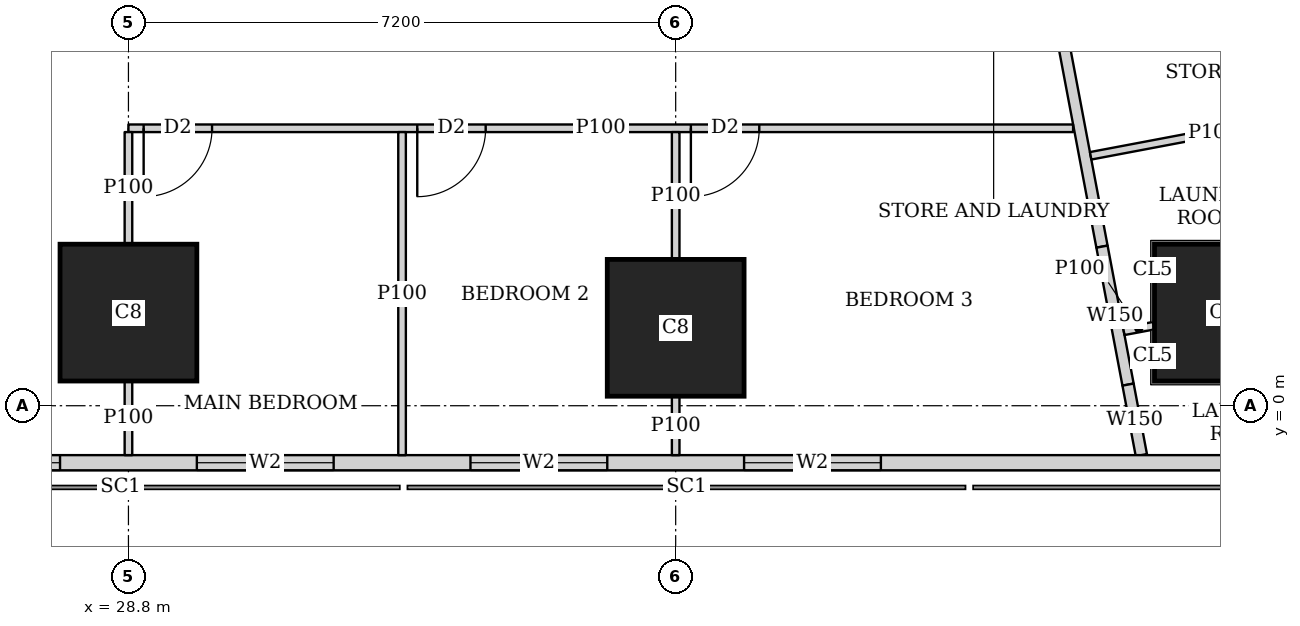
"""IFC4 building model, lengths in metres.
Left out: names, types, materials, properties, quantities, classifications, styles, units other than length and angle.
Written with IfcOpenShell. Run it as: python <this file> out.ifc"""

import sys

from ifc_helpers import new_model, si_unit, direction, frame, frame_2d, origin, origin_2d, place, context, subcontext, project, spatial, rectangle, extrude, element, fill, save


model = new_model("IFC4")
c1 = context("Model", 3, precision=1e-05, world=origin(), true_north=direction((0.0, 1.0)))
c2 = subcontext(c1, "Body", "Model", "MODEL_VIEW")
j1 = project(units=[si_unit("LENGTHUNIT", "METRE"), si_unit("PLANEANGLEUNIT", "RADIAN")], contexts=[c1])
p1 = place(None, origin())
s1 = spatial("IfcSite", under=j1, at=p1, CompositionType="ELEMENT")
p2 = place(p1, origin())
s2 = spatial("IfcBuilding", under=s1, at=p2, CompositionType="ELEMENT")
p3 = place(p2, frame((0.0, 0.0, 147.05)))
s3 = spatial("IfcBuildingStorey", under=s2, at=p3, CompositionType="ELEMENT", Elevation=147.05)
for number, where, z_axis, x_axis in (
    (1, (28.8, 1.225, 0.0), (0.0, 0.0, 1.0), (1.0, 0.0, 0.0)),
    (2, (36.0, 1.025, 0.0), (0.0, 0.0, 1.0), (1.0, 0.0, 0.0)),
    (3, (43.2, 1.225, 0.0), (0.0, 0.0, 1.0), (1.0, 0.0, 0.0)),
):
    element("IfcColumn", number, at=place(p3, frame(where, z_axis=z_axis, x_axis=x_axis)), inside=s3, PredefinedType="COLUMN", context=c2, shape_type="SweptSolid", body=[
        extrude(rectangle(XDim=1.8, YDim=1.8, at=origin_2d()), origin(), (0.0, 0.0, 1.0), 3.75),
    ])
p4 = place(p3, frame((2.163, -0.75, 0.0), z_axis=(0.0, 0.0, 1.0), x_axis=(1.0, 0.0, 0.0)))
e4 = element("IfcWall", 4, at=p4, inside=s3, PredefinedType="SOLIDWALL", context=c2, shape_type="SweptSolid", body=[
    extrude(rectangle(XDim=45.628, YDim=0.2, at=frame_2d((22.814, 0.0))), origin(), (0.0, 0.0, 1.0), 3.5),
])
p5 = place(p4, frame((9.537, 0.0, 0.9)))
e5 = element("IfcOpeningElement", 5, at=p5, cuts=e4, PredefinedType="OPENING", context=c2, shape_type="SweptSolid", body=[
    extrude(rectangle(XDim=1.8, YDim=1.5, at=frame_2d((0.9, 0.75))), frame((0.0, 0.11, 0.0), z_axis=(0.0, -1.0, 0.0), x_axis=(1.0, 0.0, 0.0)), (0.0, 0.0, 1.0), 0.22),
])
p6 = place(p4, frame((13.137, 0.0, 0.9)))
e6 = element("IfcOpeningElement", 6, at=p6, cuts=e4, PredefinedType="OPENING", context=c2, shape_type="SweptSolid", body=[
    extrude(rectangle(XDim=1.8, YDim=1.5, at=frame_2d((0.9, 0.75))), frame((0.0, 0.11, 0.0), z_axis=(0.0, -1.0, 0.0), x_axis=(1.0, 0.0, 0.0)), (0.0, 0.0, 1.0), 0.22),
])
p7 = place(p4, frame((16.737, 0.0, 0.9)))
e7 = element("IfcOpeningElement", 7, at=p7, cuts=e4, PredefinedType="OPENING", context=c2, shape_type="SweptSolid", body=[
    extrude(rectangle(XDim=1.8, YDim=1.5, at=frame_2d((0.9, 0.75))), frame((0.0, 0.11, 0.0), z_axis=(0.0, -1.0, 0.0), x_axis=(1.0, 0.0, 0.0)), (0.0, 0.0, 1.0), 0.22),
])
p8 = place(p4, frame((20.337, 0.0, 0.9)))
e8 = element("IfcOpeningElement", 8, at=p8, cuts=e4, PredefinedType="OPENING", context=c2, shape_type="SweptSolid", body=[
    extrude(rectangle(XDim=1.8, YDim=1.5, at=frame_2d((0.9, 0.75))), frame((0.0, 0.11, 0.0), z_axis=(0.0, -1.0, 0.0), x_axis=(1.0, 0.0, 0.0)), (0.0, 0.0, 1.0), 0.22),
])
p9 = place(p4, frame((23.937, 0.0, 0.9)))
e9 = element("IfcOpeningElement", 9, at=p9, cuts=e4, PredefinedType="OPENING", context=c2, shape_type="SweptSolid", body=[
    extrude(rectangle(XDim=1.8, YDim=1.5, at=frame_2d((0.9, 0.75))), frame((0.0, 0.11, 0.0), z_axis=(0.0, -1.0, 0.0), x_axis=(1.0, 0.0, 0.0)), (0.0, 0.0, 1.0), 0.22),
])
p10 = place(p4, frame((27.537, 0.0, 0.9)))
e10 = element("IfcOpeningElement", 10, at=p10, cuts=e4, PredefinedType="OPENING", context=c2, shape_type="SweptSolid", body=[
    extrude(rectangle(XDim=1.8, YDim=1.5, at=frame_2d((0.9, 0.75))), frame((0.0, 0.11, 0.0), z_axis=(0.0, -1.0, 0.0), x_axis=(1.0, 0.0, 0.0)), (0.0, 0.0, 1.0), 0.22),
])
p11 = place(p4, frame((31.137, 0.0, 0.9)))
e11 = element("IfcOpeningElement", 11, at=p11, cuts=e4, PredefinedType="OPENING", context=c2, shape_type="SweptSolid", body=[
    extrude(rectangle(XDim=1.8, YDim=1.5, at=frame_2d((0.9, 0.75))), frame((0.0, 0.11, 0.0), z_axis=(0.0, -1.0, 0.0), x_axis=(1.0, 0.0, 0.0)), (0.0, 0.0, 1.0), 0.22),
])
p12 = place(p4, frame((34.737, 0.0, 0.9)))
e12 = element("IfcOpeningElement", 12, at=p12, cuts=e4, PredefinedType="OPENING", context=c2, shape_type="SweptSolid", body=[
    extrude(rectangle(XDim=1.8, YDim=1.5, at=frame_2d((0.9, 0.75))), frame((0.0, 0.11, 0.0), z_axis=(0.0, -1.0, 0.0), x_axis=(1.0, 0.0, 0.0)), (0.0, 0.0, 1.0), 0.22),
])
p13 = place(p3, frame((50.653, 2.703, 0.0), z_axis=(0.0, 0.0, 1.0), x_axis=(-0.185612026696, 0.982623109613, 0.0)))
e13 = element("IfcWall", 13, at=p13, inside=s3, PredefinedType="SOLIDWALL", context=c2, shape_type="SweptSolid", body=[
    extrude(rectangle(XDim=41.393, YDim=0.2, at=frame_2d((20.697, 0.0))), origin(), (0.0, 0.0, 1.0), 3.5),
])
p14 = place(p13, frame((1.633, 0.0, 0.9)))
e14 = element("IfcOpeningElement", 14, at=p14, cuts=e13, PredefinedType="OPENING", context=c2, shape_type="SweptSolid", body=[
    extrude(rectangle(XDim=1.8, YDim=1.5, at=frame_2d((0.9, 0.75))), frame((0.0, 0.11, 0.0), z_axis=(0.0, -1.0, 0.0), x_axis=(1.0, 0.0, 0.0)), (0.0, 0.0, 1.0), 0.22),
])
p15 = place(p13, frame((6.032, 0.0, 0.9)))
e15 = element("IfcOpeningElement", 15, at=p15, cuts=e13, PredefinedType="OPENING", context=c2, shape_type="SweptSolid", body=[
    extrude(rectangle(XDim=1.8, YDim=1.5, at=frame_2d((0.9, 0.75))), frame((0.0, 0.11, 0.0), z_axis=(0.0, -1.0, 0.0), x_axis=(1.0, 0.0, 0.0)), (0.0, 0.0, 1.0), 0.22),
])
p16 = place(p13, frame((9.848, 0.0, 0.9)))
e16 = element("IfcOpeningElement", 16, at=p16, cuts=e13, PredefinedType="OPENING", context=c2, shape_type="SweptSolid", body=[
    extrude(rectangle(XDim=1.8, YDim=1.5, at=frame_2d((0.9, 0.75))), frame((0.0, 0.11, 0.0), z_axis=(0.0, -1.0, 0.0), x_axis=(1.0, 0.0, 0.0)), (0.0, 0.0, 1.0), 0.22),
])
p17 = place(p13, frame((13.664, 0.0, 0.9)))
e17 = element("IfcOpeningElement", 17, at=p17, cuts=e13, PredefinedType="OPENING", context=c2, shape_type="SweptSolid", body=[
    extrude(rectangle(XDim=1.8, YDim=1.5, at=frame_2d((0.9, 0.75))), frame((0.0, 0.11, 0.0), z_axis=(0.0, -1.0, 0.0), x_axis=(1.0, 0.0, 0.0)), (0.0, 0.0, 1.0), 0.22),
])
p18 = place(p13, frame((17.481, 0.0, 0.9)))
e18 = element("IfcOpeningElement", 18, at=p18, cuts=e13, PredefinedType="OPENING", context=c2, shape_type="SweptSolid", body=[
    extrude(rectangle(XDim=1.8, YDim=1.5, at=frame_2d((0.9, 0.75))), frame((0.0, 0.11, 0.0), z_axis=(0.0, -1.0, 0.0), x_axis=(1.0, 0.0, 0.0)), (0.0, 0.0, 1.0), 0.22),
])
p19 = place(p13, frame((21.297, 0.0, 0.9)))
e19 = element("IfcOpeningElement", 19, at=p19, cuts=e13, PredefinedType="OPENING", context=c2, shape_type="SweptSolid", body=[
    extrude(rectangle(XDim=1.8, YDim=1.5, at=frame_2d((0.9, 0.75))), frame((0.0, 0.11, 0.0), z_axis=(0.0, -1.0, 0.0), x_axis=(1.0, 0.0, 0.0)), (0.0, 0.0, 1.0), 0.22),
])
p20 = place(p13, frame((25.113, 0.0, 0.9)))
e20 = element("IfcOpeningElement", 20, at=p20, cuts=e13, PredefinedType="OPENING", context=c2, shape_type="SweptSolid", body=[
    extrude(rectangle(XDim=1.8, YDim=1.5, at=frame_2d((0.9, 0.75))), frame((0.0, 0.11, 0.0), z_axis=(0.0, -1.0, 0.0), x_axis=(1.0, 0.0, 0.0)), (0.0, 0.0, 1.0), 0.22),
])
p21 = place(p13, frame((28.93, 0.0, 0.9)))
e21 = element("IfcOpeningElement", 21, at=p21, cuts=e13, PredefinedType="OPENING", context=c2, shape_type="SweptSolid", body=[
    extrude(rectangle(XDim=1.8, YDim=1.5, at=frame_2d((0.9, 0.75))), frame((0.0, 0.11, 0.0), z_axis=(0.0, -1.0, 0.0), x_axis=(1.0, 0.0, 0.0)), (0.0, 0.0, 1.0), 0.22),
])
p22 = place(p13, frame((32.746, 0.0, 0.9)))
e22 = element("IfcOpeningElement", 22, at=p22, cuts=e13, PredefinedType="OPENING", context=c2, shape_type="SweptSolid", body=[
    extrude(rectangle(XDim=1.8, YDim=1.5, at=frame_2d((0.9, 0.75))), frame((0.0, 0.11, 0.0), z_axis=(0.0, -1.0, 0.0), x_axis=(1.0, 0.0, 0.0)), (0.0, 0.0, 1.0), 0.22),
])
p23 = place(p13, frame((36.481, 0.0, 0.9)))
e23 = element("IfcOpeningElement", 23, at=p23, cuts=e13, PredefinedType="OPENING", context=c2, shape_type="SweptSolid", body=[
    extrude(rectangle(XDim=1.8, YDim=1.5, at=frame_2d((0.9, 0.75))), frame((0.0, 0.11, 0.0), z_axis=(0.0, -1.0, 0.0), x_axis=(1.0, 0.0, 0.0)), (0.0, 0.0, 1.0), 0.22),
])
p24 = place(p3, frame((33.877, 43.029, 0.0), z_axis=(0.0, 0.0, 1.0), x_axis=(0.185596841028, -0.98262597798, 0.0)))
e24 = element("IfcWall", 24, at=p24, inside=s3, PredefinedType="SOLIDWALL", context=c2, shape_type="SweptSolid", body=[
    extrude(rectangle(XDim=41.66, YDim=0.15, at=frame_2d((20.83, 0.0))), origin(), (0.0, 0.0, 1.0), 2.5),
])
p25 = place(p24, frame((12.57, 0.0, 0.0)))
e25 = element("IfcOpeningElement", 25, at=p25, cuts=e24, PredefinedType="OPENING", context=c2, shape_type="SweptSolid", body=[
    extrude(rectangle(XDim=1.0, YDim=2.1, at=frame_2d((0.5, 1.05))), frame((0.0, 0.085, 0.0), z_axis=(0.0, -1.0, 0.0), x_axis=(1.0, 0.0, 0.0)), (0.0, 0.0, 1.0), 0.17),
])
p26 = place(p24, frame((16.386, 0.0, 0.0)))
e26 = element("IfcOpeningElement", 26, at=p26, cuts=e24, PredefinedType="OPENING", context=c2, shape_type="SweptSolid", body=[
    extrude(rectangle(XDim=1.0, YDim=2.1, at=frame_2d((0.5, 1.05))), frame((0.0, 0.085, 0.0), z_axis=(0.0, -1.0, 0.0), x_axis=(1.0, 0.0, 0.0)), (0.0, 0.0, 1.0), 0.17),
])
p27 = place(p24, frame((31.166, 0.0, 0.0)))
e27 = element("IfcOpeningElement", 27, at=p27, cuts=e24, PredefinedType="OPENING", context=c2, shape_type="SweptSolid", body=[
    extrude(rectangle(XDim=1.0, YDim=2.1, at=frame_2d((0.5, 1.05))), frame((0.0, 0.085, 0.0), z_axis=(0.0, -1.0, 0.0), x_axis=(1.0, 0.0, 0.0)), (0.0, 0.0, 1.0), 0.17),
])
p28 = place(p3, frame((41.609, 2.093, 0.0), z_axis=(0.0, 0.0, 1.0), x_axis=(0.185708872674, -0.982604811005, 0.0)))
e28 = element("IfcWall", 28, at=p28, inside=s3, PredefinedType="SOLIDWALL", context=c2, shape_type="SweptSolid", body=[
    extrude(rectangle(XDim=1.847, YDim=0.15, at=frame_2d((0.924, 0.0))), origin(), (0.0, 0.0, 1.0), 2.1),
])
p29 = place(p3, frame((41.952, 0.278, 0.0), z_axis=(0.0, 0.0, 1.0), x_axis=(0.185365466984, -0.982669651332, 0.0)))
e29 = element("IfcWall", 29, at=p29, inside=s3, PredefinedType="SOLIDWALL", context=c2, shape_type="SweptSolid", body=[
    extrude(rectangle(XDim=0.944, YDim=0.15, at=frame_2d((0.472, 0.0))), origin(), (0.0, 0.0, 1.0), 3.5),
])
p30 = place(p3, frame((41.229, 3.65, 0.0), z_axis=(0.0, 0.0, 1.0), x_axis=(-1.0, 0.0, 0.0)))
e30 = element("IfcWall", 30, at=p30, inside=s3, PredefinedType="PARTITIONING", context=c2, shape_type="SweptSolid", body=[
    extrude(rectangle(XDim=12.429, YDim=0.1, at=frame_2d((6.214, 0.0))), origin(), (0.0, 0.0, 1.0), 3.5),
])
p31 = place(p30, frame((11.329, 0.0, 0.0)))
e31 = element("IfcOpeningElement", 31, at=p31, cuts=e30, PredefinedType="OPENING", context=c2, shape_type="SweptSolid", body=[
    extrude(rectangle(XDim=0.9, YDim=2.1, at=frame_2d((0.45, 1.05))), frame((0.0, 0.06, 0.0), z_axis=(0.0, -1.0, 0.0), x_axis=(1.0, 0.0, 0.0)), (0.0, 0.0, 1.0), 0.12),
])
p32 = place(p30, frame((7.729, 0.0, 0.0)))
e32 = element("IfcOpeningElement", 32, at=p32, cuts=e30, PredefinedType="OPENING", context=c2, shape_type="SweptSolid", body=[
    extrude(rectangle(XDim=0.9, YDim=2.1, at=frame_2d((0.45, 1.05))), frame((0.0, 0.06, 0.0), z_axis=(0.0, -1.0, 0.0), x_axis=(1.0, 0.0, 0.0)), (0.0, 0.0, 1.0), 0.12),
])
p33 = place(p30, frame((4.129, 0.0, 0.0)))
e33 = element("IfcOpeningElement", 33, at=p33, cuts=e30, PredefinedType="OPENING", context=c2, shape_type="SweptSolid", body=[
    extrude(rectangle(XDim=0.9, YDim=2.1, at=frame_2d((0.45, 1.05))), frame((0.0, 0.06, 0.0), z_axis=(0.0, -1.0, 0.0), x_axis=(1.0, 0.0, 0.0)), (0.0, 0.0, 1.0), 0.12),
])
p34 = place(p3, frame((28.8, -0.65, 0.0), z_axis=(0.0, 0.0, 1.0), x_axis=(0.0, 1.0, 0.0)))
e34 = element("IfcWall", 34, at=p34, inside=s3, PredefinedType="PARTITIONING", context=c2, shape_type="SweptSolid", body=[
    extrude(rectangle(XDim=0.974, YDim=0.1, at=frame_2d((0.487, 0.0))), origin(), (0.0, 0.0, 1.0), 3.5),
])
p35 = place(p3, frame((28.8, 2.126, 0.0), z_axis=(0.0, 0.0, 1.0), x_axis=(0.0, 1.0, 0.0)))
e35 = element("IfcWall", 35, at=p35, inside=s3, PredefinedType="PARTITIONING", context=c2, shape_type="SweptSolid", body=[
    extrude(rectangle(XDim=1.474, YDim=0.1, at=frame_2d((0.737, 0.0))), origin(), (0.0, 0.0, 1.0), 3.5),
])
p36 = place(p3, frame((32.4, -0.65, 0.0), z_axis=(0.0, 0.0, 1.0), x_axis=(0.0, 1.0, 0.0)))
e36 = element("IfcWall", 36, at=p36, inside=s3, PredefinedType="PARTITIONING", context=c2, shape_type="SweptSolid", body=[
    extrude(rectangle(XDim=4.25, YDim=0.1, at=frame_2d((2.125, 0.0))), origin(), (0.0, 0.0, 1.0), 2.1),
])
p37 = place(p3, frame((36.0, -0.65, 0.0), z_axis=(0.0, 0.0, 1.0), x_axis=(0.0, 1.0, 0.0)))
e37 = element("IfcWall", 37, at=p37, inside=s3, PredefinedType="PARTITIONING", context=c2, shape_type="SweptSolid", body=[
    extrude(rectangle(XDim=0.774, YDim=0.1, at=frame_2d((0.387, 0.0))), origin(), (0.0, 0.0, 1.0), 3.5),
])
p38 = place(p3, frame((36.0, 1.926, 0.0), z_axis=(0.0, 0.0, 1.0), x_axis=(0.0, 1.0, 0.0)))
e38 = element("IfcWall", 38, at=p38, inside=s3, PredefinedType="PARTITIONING", context=c2, shape_type="SweptSolid", body=[
    extrude(rectangle(XDim=1.674, YDim=0.1, at=frame_2d((0.837, 0.0))), origin(), (0.0, 0.0, 1.0), 3.5),
])
p39 = place(p3, frame((42.29, 1.053, 0.0), z_axis=(0.0, 0.0, 1.0), x_axis=(-0.982830800147, -0.184509127909, 0.0)))
e39 = element("IfcWall", 39, at=p39, inside=s3, PredefinedType="PARTITIONING", context=c2, shape_type="SweptSolid", body=[
    extrude(rectangle(XDim=0.401, YDim=0.1, at=frame_2d((0.2, 0.0))), origin(), (0.0, 0.0, 1.0), 2.1),
])
p40 = place(p3, frame((44.677, 3.896, 0.0), z_axis=(0.0, 0.0, 1.0), x_axis=(-0.982610347627, -0.185679575441, 0.0)))
e40 = element("IfcWall", 40, at=p40, inside=s3, PredefinedType="PARTITIONING", context=c2, shape_type="SweptSolid", body=[
    extrude(rectangle(XDim=3.274, YDim=0.1, at=frame_2d((1.637, 0.0))), origin(), (0.0, 0.0, 1.0), 3.5),
])
p41 = place(p9, origin())
e41 = element("IfcWindow", 41, at=p41, inside=s3, PartitioningType="SINGLE_PANEL", PredefinedType="WINDOW", context=c2, shape_type="SweptSolid", body=[
    extrude(rectangle(XDim=1.8, YDim=1.5, at=frame_2d((0.9, 0.75))), frame((0.0, 0.03, 0.0), z_axis=(0.0, -1.0, 0.0), x_axis=(1.0, 0.0, 0.0)), (0.0, 0.0, 1.0), 0.06),
])
fill(e9, e41)
p42 = place(p10, origin())
e42 = element("IfcWindow", 42, at=p42, inside=s3, PartitioningType="SINGLE_PANEL", PredefinedType="WINDOW", context=c2, shape_type="SweptSolid", body=[
    extrude(rectangle(XDim=1.8, YDim=1.5, at=frame_2d((0.9, 0.75))), frame((0.0, 0.03, 0.0), z_axis=(0.0, -1.0, 0.0), x_axis=(1.0, 0.0, 0.0)), (0.0, 0.0, 1.0), 0.06),
])
fill(e10, e42)
p43 = place(p11, origin())
e43 = element("IfcWindow", 43, at=p43, inside=s3, PartitioningType="SINGLE_PANEL", PredefinedType="WINDOW", context=c2, shape_type="SweptSolid", body=[
    extrude(rectangle(XDim=1.8, YDim=1.5, at=frame_2d((0.9, 0.75))), frame((0.0, 0.03, 0.0), z_axis=(0.0, -1.0, 0.0), x_axis=(1.0, 0.0, 0.0)), (0.0, 0.0, 1.0), 0.06),
])
fill(e11, e43)
p44 = place(p12, origin())
e44 = element("IfcWindow", 44, at=p44, inside=s3, PartitioningType="SINGLE_PANEL", PredefinedType="WINDOW", context=c2, shape_type="SweptSolid", body=[
    extrude(rectangle(XDim=1.8, YDim=1.5, at=frame_2d((0.9, 0.75))), frame((0.0, 0.03, 0.0), z_axis=(0.0, -1.0, 0.0), x_axis=(1.0, 0.0, 0.0)), (0.0, 0.0, 1.0), 0.06),
])
fill(e12, e44)
p45 = place(p31, origin())
e45 = element("IfcDoor", 45, at=p45, inside=s3, OperationType="SINGLE_SWING_RIGHT", PredefinedType="DOOR", context=c2, shape_type="SweptSolid", body=[
    extrude(rectangle(XDim=0.9, YDim=2.1, at=frame_2d((0.45, 1.05))), frame((0.0, 0.025, 0.0), z_axis=(0.0, -1.0, 0.0), x_axis=(1.0, 0.0, 0.0)), (0.0, 0.0, 1.0), 0.05),
])
fill(e31, e45)
p46 = place(p32, origin())
e46 = element("IfcDoor", 46, at=p46, inside=s3, OperationType="SINGLE_SWING_RIGHT", PredefinedType="DOOR", context=c2, shape_type="SweptSolid", body=[
    extrude(rectangle(XDim=0.9, YDim=2.1, at=frame_2d((0.45, 1.05))), frame((0.0, 0.025, 0.0), z_axis=(0.0, -1.0, 0.0), x_axis=(1.0, 0.0, 0.0)), (0.0, 0.0, 1.0), 0.05),
])
fill(e32, e46)
p47 = place(p33, origin())
e47 = element("IfcDoor", 47, at=p47, inside=s3, OperationType="SINGLE_SWING_RIGHT", PredefinedType="DOOR", context=c2, shape_type="SweptSolid", body=[
    extrude(rectangle(XDim=0.9, YDim=2.1, at=frame_2d((0.45, 1.05))), frame((0.0, 0.025, 0.0), z_axis=(0.0, -1.0, 0.0), x_axis=(1.0, 0.0, 0.0)), (0.0, 0.0, 1.0), 0.05),
])
fill(e33, e47)
save(model, sys.argv[1])
